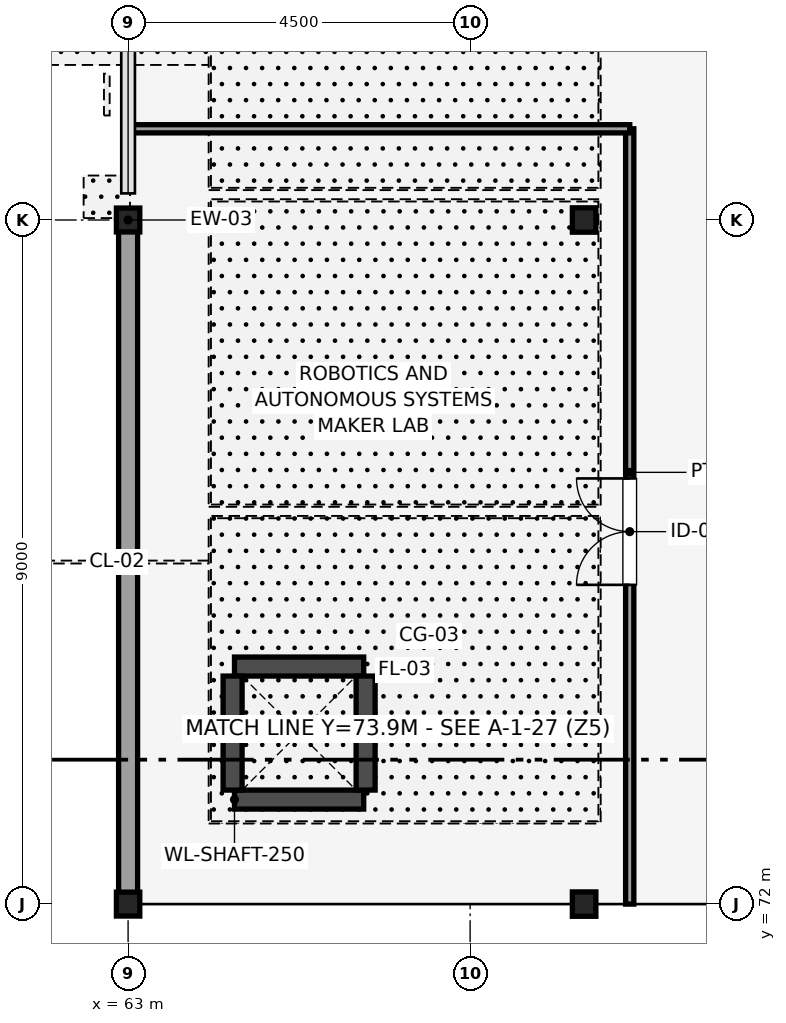
"""IFC4 building model, lengths in metres.
Left out: names, types, materials, properties, quantities, classifications, styles, units other than length and angle.
Written with IfcOpenShell. Run it as: python <this file> out.ifc"""

import sys

from ifc_helpers import new_model, si_unit, direction, frame, frame_2d, origin, origin_2d, place, context, subcontext, project, spatial, rectangle, i_section, extrude, element, fill, save


model = new_model("IFC4")
c1 = context("Model", 3, precision=1e-05, world=origin(), true_north=direction((0.0, 1.0)))
c2 = subcontext(c1, "Body", "Model", "MODEL_VIEW")
j1 = project(units=[si_unit("LENGTHUNIT", "METRE"), si_unit("PLANEANGLEUNIT", "RADIAN")], contexts=[c1])
p1 = place(None, origin())
s1 = spatial("IfcSite", under=j1, at=p1, CompositionType="ELEMENT")
p2 = place(p1, origin())
s2 = spatial("IfcBuilding", under=s1, at=p2, CompositionType="ELEMENT")
p3 = place(p2, frame((0.0, 0.0, 9.9)))
s3 = spatial("IfcBuildingStorey", under=s2, at=p3, CompositionType="ELEMENT", Elevation=9.9)
for number, where, z_axis, x_axis in (
    (1, (63.0, 72.0, 0.0), (0.0, 0.0, 1.0), (1.0, 0.0, 0.0)),
    (2, (63.0, 81.0, 0.0), (0.0, 0.0, 1.0), (1.0, 0.0, 0.0)),
):
    element("IfcColumn", number, at=place(p3, frame(where, z_axis=z_axis, x_axis=x_axis)), inside=s3, PredefinedType="COLUMN", context=c2, shape_type="SweptSolid", body=[
        extrude(i_section(OverallWidth=0.307, OverallDepth=0.315, WebThickness=0.012, FlangeThickness=0.019, FilletRadius=0.017, at=origin_2d()), origin(), (0.0, 0.0, 1.0), 4.5),
    ])
for number, where, z_axis, x_axis in (
    (3, (69.0, 72.0, 0.0), (0.0, 0.0, 1.0), (1.0, 0.0, 0.0)),
    (4, (69.0, 81.0, 0.0), (0.0, 0.0, 1.0), (1.0, 0.0, 0.0)),
):
    element("IfcColumn", number, at=place(p3, frame(where, z_axis=z_axis, x_axis=x_axis)), inside=s3, PredefinedType="COLUMN", context=c2, shape_type="SweptSolid", body=[
        extrude(i_section(OverallWidth=0.309, OverallDepth=0.321, WebThickness=0.014, FlangeThickness=0.022, FilletRadius=0.017, at=origin_2d()), origin(), (0.0, 0.0, 1.0), 4.5),
    ])
for number, where, z_axis, x_axis in (
    (5, (64.4, 73.375, 0.0), (0.0, 0.0, 1.0), (1.0, 0.0, 0.0)),
    (6, (64.4, 75.125, 0.0), (0.0, 0.0, 1.0), (1.0, 0.0, 0.0)),
):
    element("IfcWall", number, at=place(p3, frame(where, z_axis=z_axis, x_axis=x_axis)), inside=s3, PredefinedType="SHEAR", context=c2, shape_type="SweptSolid", body=[
        extrude(rectangle(XDim=1.7, YDim=0.25, at=frame_2d((0.85, 0.0))), origin(), (0.0, 0.0, 1.0), 3.77),
    ])
for number, where, z_axis, x_axis in (
    (7, (64.375, 73.5, 0.0), (0.0, 0.0, 1.0), (0.0, 1.0, 0.0)),
    (8, (66.125, 73.5, 0.0), (0.0, 0.0, 1.0), (0.0, 1.0, 0.0)),
):
    element("IfcWall", number, at=place(p3, frame(where, z_axis=z_axis, x_axis=x_axis)), inside=s3, PredefinedType="SHEAR", context=c2, shape_type="SweptSolid", body=[
        extrude(rectangle(XDim=1.5, YDim=0.25, at=frame_2d((0.75, 0.0))), origin(), (0.0, 0.0, 1.0), 3.77),
    ])
p4 = place(p3, frame((63.0, 72.0, 0.0), z_axis=(0.0, 0.0, 1.0), x_axis=(1.0, 0.0, 0.0)))
e9 = element("IfcWall", 9, at=p4, inside=s3, PredefinedType="STANDARD", context=c2, shape_type="SweptSolid", body=[
    extrude(rectangle(XDim=6.0, YDim=0.25, at=frame_2d((3.0, 0.0))), origin(), (0.0, 0.0, 1.0), 3.846),
])
p5 = place(p4, frame((0.75, 0.0, 1.0)))
e10 = element("IfcOpeningElement", 10, at=p5, cuts=e9, PredefinedType="OPENING", context=c2, shape_type="SweptSolid", body=[
    extrude(rectangle(XDim=1.5, YDim=1.5, at=frame_2d((0.75, 0.75))), frame((0.0, 0.135, 0.0), z_axis=(0.0, -1.0, 0.0), x_axis=(1.0, 0.0, 0.0)), (0.0, 0.0, 1.0), 0.27),
])
p6 = place(p3, frame((69.0, 72.0, 0.0), z_axis=(0.0, 0.0, 1.0), x_axis=(1.0, 0.0, 0.0)))
e11 = element("IfcWall", 11, at=p6, inside=s3, PredefinedType="STANDARD", context=c2, shape_type="SweptSolid", body=[
    extrude(rectangle(XDim=3.0, YDim=0.25, at=frame_2d((1.5, 0.0))), origin(), (0.0, 0.0, 1.0), 3.846),
])
p7 = place(p3, frame((63.0, 81.0, 0.0), z_axis=(0.0, 0.0, 1.0), x_axis=(0.0, -1.0, 0.0)))
e12 = element("IfcWall", 12, at=p7, inside=s3, PredefinedType="STANDARD", context=c2, shape_type="SweptSolid", body=[
    extrude(rectangle(XDim=9.0, YDim=0.25, at=frame_2d((4.5, 0.0))), origin(), (0.0, 0.0, 1.0), 3.772),
])
p8 = place(p3, frame((69.6, 72.0, 0.0), z_axis=(0.0, 0.0, 1.0), x_axis=(0.0, 1.0, 0.0)))
e13 = element("IfcWall", 13, at=p8, inside=s3, PredefinedType="PARTITIONING", context=c2, shape_type="SweptSolid", body=[
    extrude(rectangle(XDim=10.2, YDim=0.108, at=frame_2d((5.1, 0.0))), origin(), (0.0, 0.0, 1.0), 4.32),
])
p9 = place(p8, frame((4.2, 0.0, 0.0)))
e14 = element("IfcOpeningElement", 14, at=p9, cuts=e13, PredefinedType="OPENING", context=c2, shape_type="SweptSolid", body=[
    extrude(rectangle(XDim=1.4, YDim=2.2, at=frame_2d((0.7, 1.1))), frame((0.0, 0.064, 0.0), z_axis=(0.0, -1.0, 0.0), x_axis=(1.0, 0.0, 0.0)), (0.0, 0.0, 1.0), 0.128),
])
p10 = place(p3, frame((63.0, 82.2, 0.0), z_axis=(0.0, 0.0, 1.0), x_axis=(1.0, 0.0, 0.0)))
e15 = element("IfcWall", 15, at=p10, inside=s3, PredefinedType="PARTITIONING", context=c2, shape_type="SweptSolid", body=[
    extrude(rectangle(XDim=6.6, YDim=0.108, at=frame_2d((3.3, 0.0))), origin(), (0.0, 0.0, 1.0), 4.32),
])
p11 = place(p5, origin())
e16 = element("IfcWindow", 16, at=p11, inside=s3, PartitioningType="SINGLE_PANEL", PredefinedType="WINDOW", context=c2, shape_type="SweptSolid", body=[
    extrude(rectangle(XDim=1.5, YDim=1.5, at=frame_2d((0.75, 0.75))), frame((0.0, 0.03, 0.0), z_axis=(0.0, -1.0, 0.0), x_axis=(1.0, 0.0, 0.0)), (0.0, 0.0, 1.0), 0.06),
])
fill(e10, e16)
p12 = place(p9, origin())
e17 = element("IfcDoor", 17, at=p12, inside=s3, OperationType="DOUBLE_DOOR_SINGLE_SWING", PredefinedType="DOOR", context=c2, shape_type="SweptSolid", body=[
    extrude(rectangle(XDim=1.4, YDim=2.2, at=frame_2d((0.7, 1.1))), frame((0.0, 0.025, 0.0), z_axis=(0.0, -1.0, 0.0), x_axis=(1.0, 0.0, 0.0)), (0.0, 0.0, 1.0), 0.05),
])
fill(e14, e17)
save(model, sys.argv[1])
